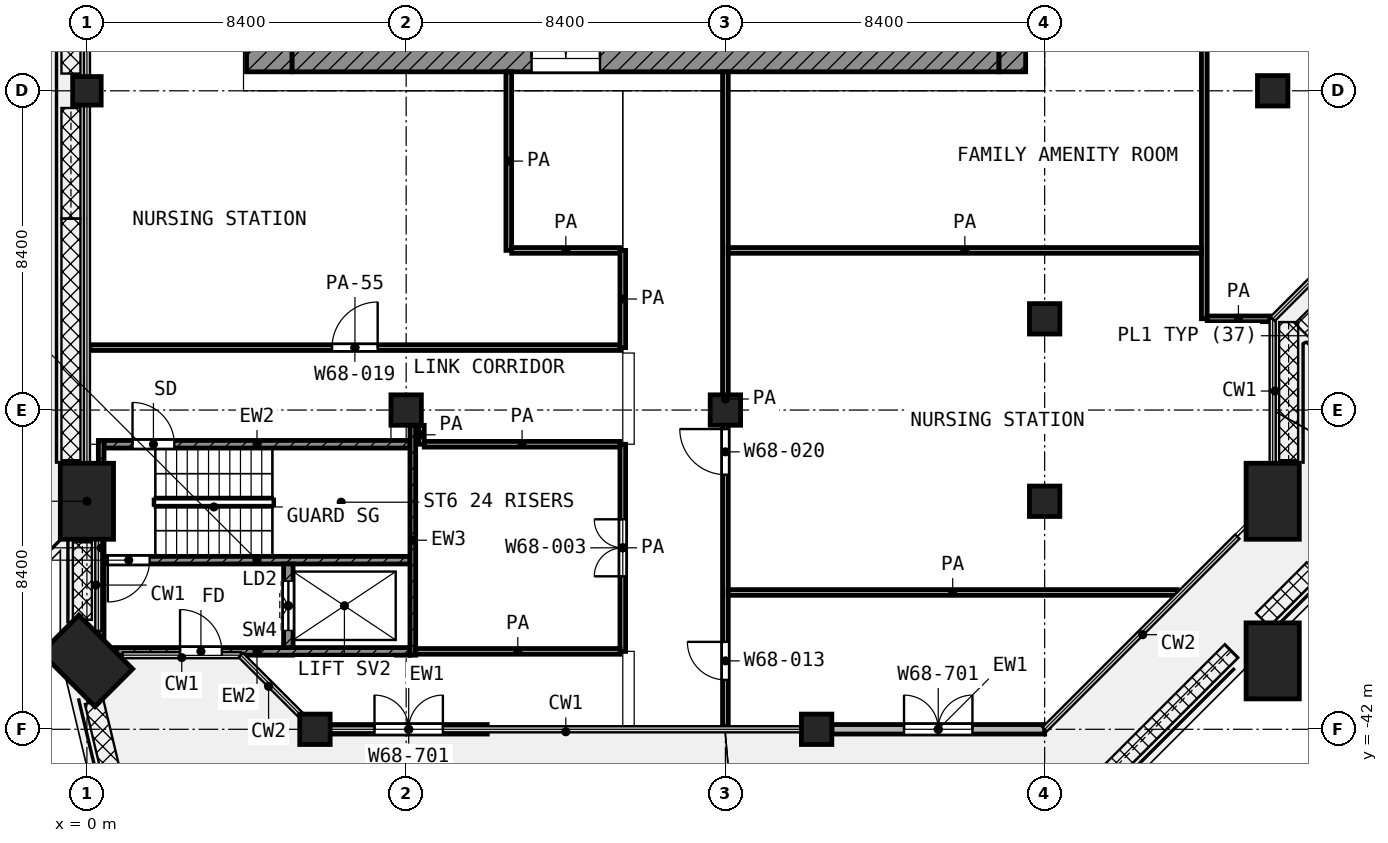
"""IFC4 building model, lengths in metres.
Left out: names, types, materials, properties, quantities, classifications, styles, units other than length and angle.
Written with IfcOpenShell. Run it as: python <this file> out.ifc"""

import sys

from ifc_helpers import new_model, si_unit, direction, frame, frame_2d, origin, origin_2d, place, context, subcontext, project, spatial, rectangle, extrude, element, fill, save


model = new_model("IFC4")
c1 = context("Model", 3, precision=1e-05, world=origin(), true_north=direction((0.0, 1.0)))
c2 = subcontext(c1, "Body", "Model", "MODEL_VIEW")
j1 = project(units=[si_unit("LENGTHUNIT", "METRE"), si_unit("PLANEANGLEUNIT", "RADIAN")], contexts=[c1])
p1 = place(None, origin())
s1 = spatial("IfcSite", under=j1, at=p1, CompositionType="ELEMENT")
p2 = place(p1, origin())
s2 = spatial("IfcBuilding", under=s1, at=p2, CompositionType="ELEMENT")
p3 = place(p2, frame((0.0, 0.0, 294.4)))
s3 = spatial("IfcBuildingStorey", under=s2, at=p3, CompositionType="ELEMENT", Elevation=294.4)
p4 = place(p3, frame((0.0, -25.2, 0.0), z_axis=(0.0, 0.0, 1.0), x_axis=(1.0, 0.0, 0.0)))
e1 = element("IfcColumn", 1, at=p4, inside=s3, PredefinedType="COLUMN", context=c2, shape_type="SweptSolid", body=[
    extrude(rectangle(XDim=0.75, YDim=0.75, at=origin_2d()), origin(), (0.0, 0.0, 1.0), 4.2),
])
for number, where, z_axis, x_axis in (
    (2, (31.2, -25.2, 0.0), (0.0, 0.0, 1.0), (1.0, 0.0, 0.0)),
    (3, (25.2, -31.2, 0.0), (0.0, 0.0, 1.0), (1.0, 0.0, 0.0)),
    (4, (8.4, -33.6, 0.0), (0.0, 0.0, 1.0), (1.0, 0.0, 0.0)),
    (5, (16.8, -33.6, 0.0), (0.0, 0.0, 1.0), (1.0, 0.0, 0.0)),
):
    element("IfcColumn", number, at=place(p3, frame(where, z_axis=z_axis, x_axis=x_axis)), inside=s3, PredefinedType="COLUMN", context=c2, shape_type="SweptSolid", body=[
        extrude(rectangle(XDim=0.8, YDim=0.8, at=origin_2d()), origin(), (0.0, 0.0, 1.0), 4.2),
    ])
p5 = place(p3, frame((0.0, -36.0, 0.0), z_axis=(0.0, 0.0, 1.0), x_axis=(0.0, 1.0, 0.0)))
e6 = element("IfcColumn", 6, at=p5, inside=s3, PredefinedType="COLUMN", context=c2, shape_type="SweptSolid", body=[
    extrude(rectangle(XDim=2.0, YDim=1.4, at=origin_2d()), origin(), (0.0, 0.0, 1.0), 4.2),
])
for number, where, z_axis, x_axis in (
    (7, (25.2, -36.0, 0.0), (0.0, 0.0, 1.0), (1.0, 0.0, 0.0)),
    (8, (6.0, -42.0, 0.0), (0.0, 0.0, 1.0), (1.0, 0.0, 0.0)),
    (9, (19.2, -42.0, 0.0), (0.0, 0.0, 1.0), (1.0, 0.0, 0.0)),
):
    element("IfcColumn", number, at=place(p3, frame(where, z_axis=z_axis, x_axis=x_axis)), inside=s3, PredefinedType="COLUMN", context=c2, shape_type="SweptSolid", body=[
        extrude(rectangle(XDim=0.8, YDim=0.8, at=origin_2d()), origin(), (0.0, 0.0, 1.0), 4.2),
    ])
for number, where, z_axis, x_axis in (
    (10, (31.2, -36.0, 0.0), (0.0, 0.0, 1.0), (0.0, -1.0, 0.0)),
    (11, (31.2, -40.2, 0.0), (0.0, 0.0, 1.0), (0.0, -1.0, 0.0)),
    (12, (0.0, -40.2, 0.0), (0.0, 0.0, 1.0), (-0.707, 0.707, 0.0)),
):
    element("IfcColumn", number, at=place(p3, frame(where, z_axis=z_axis, x_axis=x_axis)), inside=s3, PredefinedType="COLUMN", context=c2, shape_type="SweptSolid", body=[
        extrude(rectangle(XDim=2.0, YDim=1.4, at=origin_2d()), origin(), (0.0, 0.0, 1.0), 4.2),
    ])
p6 = place(p3, frame((6.4, -42.0, 0.0), z_axis=(0.0, 0.0, 1.0), x_axis=(1.0, 0.0, 0.0)))
e13 = element("IfcWall", 13, at=p6, inside=s3, PredefinedType="SOLIDWALL", context=c2, shape_type="SweptSolid", body=[
    extrude(rectangle(XDim=4.134, YDim=0.25, at=frame_2d((2.067, 0.0))), origin(), (0.0, 0.0, 1.0), 3.48),
])
p7 = place(p6, frame((1.167, 0.0, 0.0)))
e14 = element("IfcOpeningElement", 14, at=p7, cuts=e13, PredefinedType="OPENING", context=c2, shape_type="SweptSolid", body=[
    extrude(rectangle(XDim=1.8, YDim=2.1, at=frame_2d((0.9, 1.05))), frame((0.0, 0.135, 0.0), z_axis=(0.0, -1.0, 0.0), x_axis=(1.0, 0.0, 0.0)), (0.0, 0.0, 1.0), 0.27),
])
p8 = place(p3, frame((19.6, -42.0, 0.0), z_axis=(0.0, 0.0, 1.0), x_axis=(1.0, 0.0, 0.0)))
e15 = element("IfcWall", 15, at=p8, inside=s3, PredefinedType="SOLIDWALL", context=c2, shape_type="SweptSolid", body=[
    extrude(rectangle(XDim=5.6, YDim=0.25, at=frame_2d((2.8, 0.0))), origin(), (0.0, 0.0, 1.0), 3.48),
])
p9 = place(p8, frame((1.9, 0.0, 0.0)))
e16 = element("IfcOpeningElement", 16, at=p9, cuts=e15, PredefinedType="OPENING", context=c2, shape_type="SweptSolid", body=[
    extrude(rectangle(XDim=1.8, YDim=2.1, at=frame_2d((0.9, 1.05))), frame((0.0, 0.135, 0.0), z_axis=(0.0, -1.0, 0.0), x_axis=(1.0, 0.0, 0.0)), (0.0, 0.0, 1.0), 0.27),
])
p10 = place(p3, frame((4.8, -24.7, 0.0), z_axis=(0.0, 0.0, 1.0), x_axis=(0.0, 1.0, 0.0)))
e17 = element("IfcWall", 17, at=p10, inside=s3, PredefinedType="SHEAR", context=c2, shape_type="SweptSolid", body=[
    extrude(rectangle(XDim=19.3, YDim=1.2, at=frame_2d((9.65, 0.0))), origin(), (0.0, 0.0, 1.0), 3.6),
])
p11 = place(p10, frame((11.15, 0.0, 0.0)))
e18 = element("IfcOpeningElement", 18, at=p11, cuts=e17, PredefinedType="OPENING", context=c2, shape_type="SweptSolid", body=[
    extrude(rectangle(XDim=1.1, YDim=2.1, at=frame_2d((0.55, 1.05))), frame((0.0, 0.61, 0.0), z_axis=(0.0, -1.0, 0.0), x_axis=(1.0, 0.0, 0.0)), (0.0, 0.0, 1.0), 1.22),
])
p12 = place(p10, frame((1.85, 0.0, 0.0)))
e19 = element("IfcOpeningElement", 19, at=p12, cuts=e17, PredefinedType="OPENING", context=c2, shape_type="SweptSolid", body=[
    extrude(rectangle(XDim=1.1, YDim=2.1, at=frame_2d((0.55, 1.05))), frame((0.0, 0.61, 0.0), z_axis=(0.0, -1.0, 0.0), x_axis=(1.0, 0.0, 0.0)), (0.0, 0.0, 1.0), 1.22),
])
p13 = place(p3, frame((5.4, -24.35, 0.0), z_axis=(0.0, 0.0, 1.0), x_axis=(1.0, 0.0, 0.0)))
e20 = element("IfcWall", 20, at=p13, inside=s3, PredefinedType="SHEAR", context=c2, shape_type="SweptSolid", body=[
    extrude(rectangle(XDim=18.6, YDim=0.7, at=frame_2d((9.3, 0.0))), origin(), (0.0, 0.0, 1.0), 3.6),
])
p14 = place(p13, frame((6.3, 0.0, 0.0)))
e21 = element("IfcOpeningElement", 21, at=p14, cuts=e20, PredefinedType="OPENING", context=c2, shape_type="SweptSolid", body=[
    extrude(rectangle(XDim=1.8, YDim=2.1, at=frame_2d((0.9, 1.05))), frame((0.0, 0.36, 0.0), z_axis=(0.0, -1.0, 0.0), x_axis=(1.0, 0.0, 0.0)), (0.0, 0.0, 1.0), 0.72),
])
p15 = place(p3, frame((24.35, -24.7, 0.0), z_axis=(0.0, 0.0, 1.0), x_axis=(0.0, 1.0, 0.0)))
e22 = element("IfcWall", 22, at=p15, inside=s3, PredefinedType="SHEAR", context=c2, shape_type="SweptSolid", body=[
    extrude(rectangle(XDim=0.7, YDim=0.7, at=frame_2d((0.35, 0.0))), origin(), (0.0, 0.0, 1.0), 3.6),
])
p16 = place(p3, frame((0.375, -40.05, 0.0), z_axis=(0.0, 0.0, 1.0), x_axis=(0.0, 1.0, 0.0)))
e23 = element("IfcWall", 23, at=p16, inside=s3, PredefinedType="SHEAR", context=c2, shape_type="SweptSolid", body=[
    extrude(rectangle(XDim=5.65, YDim=0.15, at=frame_2d((2.825, 0.0))), origin(), (0.0, 0.0, 1.0), 3.6),
])
p17 = place(p3, frame((8.575, -40.05, 0.0), z_axis=(0.0, 0.0, 1.0), x_axis=(0.0, 1.0, 0.0)))
e24 = element("IfcWall", 24, at=p17, inside=s3, PredefinedType="SHEAR", context=c2, shape_type="SweptSolid", body=[
    extrude(rectangle(XDim=6.05, YDim=0.15, at=frame_2d((3.025, 0.0))), origin(), (0.0, 0.0, 1.0), 3.6),
])
p18 = place(p3, frame((0.45, -34.5, 0.0), z_axis=(0.0, 0.0, 1.0), x_axis=(1.0, 0.0, 0.0)))
e25 = element("IfcWall", 25, at=p18, inside=s3, PredefinedType="SHEAR", context=c2, shape_type="SweptSolid", body=[
    extrude(rectangle(XDim=8.05, YDim=0.2, at=frame_2d((4.025, 0.0))), origin(), (0.0, 0.0, 1.0), 3.6),
])
p19 = place(p18, frame((0.75, 0.0, 0.0)))
e26 = element("IfcOpeningElement", 26, at=p19, cuts=e25, PredefinedType="OPENING", context=c2, shape_type="SweptSolid", body=[
    extrude(rectangle(XDim=1.1, YDim=2.1, at=frame_2d((0.55, 1.05))), frame((0.0, 0.11, 0.0), z_axis=(0.0, -1.0, 0.0), x_axis=(1.0, 0.0, 0.0)), (0.0, 0.0, 1.0), 0.22),
])
p20 = place(p3, frame((0.45, -37.55, 0.0), z_axis=(0.0, 0.0, 1.0), x_axis=(1.0, 0.0, 0.0)))
e27 = element("IfcWall", 27, at=p20, inside=s3, PredefinedType="SHEAR", context=c2, shape_type="SweptSolid", body=[
    extrude(rectangle(XDim=8.05, YDim=0.2, at=frame_2d((4.025, 0.0))), origin(), (0.0, 0.0, 1.0), 3.6),
])
p21 = place(p20, frame((0.1, 0.0, 0.0)))
e28 = element("IfcOpeningElement", 28, at=p21, cuts=e27, PredefinedType="OPENING", context=c2, shape_type="SweptSolid", body=[
    extrude(rectangle(XDim=1.1, YDim=2.1, at=frame_2d((0.55, 1.05))), frame((0.0, 0.11, 0.0), z_axis=(0.0, -1.0, 0.0), x_axis=(1.0, 0.0, 0.0)), (0.0, 0.0, 1.0), 0.22),
])
p22 = place(p3, frame((0.45, -39.95, 0.0), z_axis=(0.0, 0.0, 1.0), x_axis=(1.0, 0.0, 0.0)))
e29 = element("IfcWall", 29, at=p22, inside=s3, PredefinedType="SHEAR", context=c2, shape_type="SweptSolid", body=[
    extrude(rectangle(XDim=8.05, YDim=0.2, at=frame_2d((4.025, 0.0))), origin(), (0.0, 0.0, 1.0), 3.6),
])
p23 = place(p22, frame((2.0, 0.0, 0.0)))
e30 = element("IfcOpeningElement", 30, at=p23, cuts=e29, PredefinedType="OPENING", context=c2, shape_type="SweptSolid", body=[
    extrude(rectangle(XDim=1.1, YDim=2.1, at=frame_2d((0.55, 1.05))), frame((0.0, 0.11, 0.0), z_axis=(0.0, -1.0, 0.0), x_axis=(1.0, 0.0, 0.0)), (0.0, 0.0, 1.0), 0.22),
])
p24 = place(p3, frame((5.3, -39.85, 0.0), z_axis=(0.0, 0.0, 1.0), x_axis=(0.0, 1.0, 0.0)))
e31 = element("IfcWall", 31, at=p24, inside=s3, PredefinedType="SHEAR", context=c2, shape_type="SweptSolid", body=[
    extrude(rectangle(XDim=2.2, YDim=0.25, at=frame_2d((1.1, 0.0))), origin(), (0.0, 0.0, 1.0), 3.6),
])
p25 = place(p24, frame((0.45, 0.0, 0.0)))
e32 = element("IfcOpeningElement", 32, at=p25, cuts=e31, PredefinedType="OPENING", context=c2, shape_type="SweptSolid", body=[
    extrude(rectangle(XDim=1.3, YDim=2.1, at=frame_2d((0.65, 1.05))), frame((0.0, 0.135, 0.0), z_axis=(0.0, -1.0, 0.0), x_axis=(1.0, 0.0, 0.0)), (0.0, 0.0, 1.0), 0.27),
])
p26 = place(p3, frame((8.65, -39.95, 0.0), z_axis=(0.0, 0.0, 1.0), x_axis=(1.0, 0.0, 0.0)))
e33 = element("IfcWall", 33, at=p26, inside=s3, PredefinedType="PARTITIONING", context=c2, shape_type="SweptSolid", body=[
    extrude(rectangle(XDim=5.375, YDim=0.15, at=frame_2d((2.688, 0.0))), origin(), (0.0, 0.0, 1.0), 3.6),
])
p27 = place(p3, frame((16.875, -38.4, 0.0), z_axis=(0.0, 0.0, 1.0), x_axis=(1.0, 0.0, 0.0)))
e34 = element("IfcWall", 34, at=p27, inside=s3, PredefinedType="PARTITIONING", context=c2, shape_type="SweptSolid", body=[
    extrude(rectangle(XDim=11.812, YDim=0.15, at=frame_2d((5.906, 0.0))), origin(), (0.0, 0.0, 1.0), 3.6),
])
p28 = place(p3, frame((8.875, -34.5, 0.0), z_axis=(0.0, 0.0, 1.0), x_axis=(1.0, 0.0, 0.0)))
e35 = element("IfcWall", 35, at=p28, inside=s3, PredefinedType="PARTITIONING", context=c2, shape_type="SweptSolid", body=[
    extrude(rectangle(XDim=5.15, YDim=0.15, at=frame_2d((2.575, 0.0))), origin(), (0.0, 0.0, 1.0), 3.6),
])
p29 = place(p3, frame((0.08, -31.957, 0.0), z_axis=(0.0, 0.0, 1.0), x_axis=(1.0, 0.0, 0.0)))
e36 = element("IfcWall", 36, at=p29, inside=s3, PredefinedType="PARTITIONING", context=c2, shape_type="SweptSolid", body=[
    extrude(rectangle(XDim=13.945, YDim=0.15, at=frame_2d((6.972, 0.0))), origin(), (0.0, 0.0, 1.0), 2.7),
])
p30 = place(p29, frame((6.37, 0.0, 0.0)))
e37 = element("IfcOpeningElement", 37, at=p30, cuts=e36, PredefinedType="OPENING", context=c2, shape_type="SweptSolid", body=[
    extrude(rectangle(XDim=1.2, YDim=2.1, at=frame_2d((0.6, 1.05))), frame((0.0, 0.085, 0.0), z_axis=(0.0, -1.0, 0.0), x_axis=(1.0, 0.0, 0.0)), (0.0, 0.0, 1.0), 0.17),
])
p31 = place(p3, frame((29.477, -31.2, 0.0), z_axis=(0.0, 0.0, 1.0), x_axis=(1.0, 0.0, 0.0)))
e38 = element("IfcWall", 38, at=p31, inside=s3, PredefinedType="PARTITIONING", context=c2, shape_type="SweptSolid", body=[
    extrude(rectangle(XDim=1.643, YDim=0.15, at=frame_2d((0.822, 0.0))), origin(), (0.0, 0.0, 1.0), 3.6),
])
p32 = place(p3, frame((11.177, -29.4, 0.0), z_axis=(0.0, 0.0, 1.0), x_axis=(1.0, 0.0, 0.0)))
e39 = element("IfcWall", 39, at=p32, inside=s3, PredefinedType="PARTITIONING", context=c2, shape_type="SweptSolid", body=[
    extrude(rectangle(XDim=2.848, YDim=0.15, at=frame_2d((1.424, 0.0))), origin(), (0.0, 0.0, 1.0), 3.6),
])
p33 = place(p3, frame((16.875, -29.4, 0.0), z_axis=(0.0, 0.0, 1.0), x_axis=(1.0, 0.0, 0.0)))
e40 = element("IfcWall", 40, at=p33, inside=s3, PredefinedType="PARTITIONING", context=c2, shape_type="SweptSolid", body=[
    extrude(rectangle(XDim=12.45, YDim=0.15, at=frame_2d((6.225, 0.0))), origin(), (0.0, 0.0, 1.0), 3.6),
])
p34 = place(p3, frame((8.8, -34.5, 0.0), z_axis=(0.0, 0.0, 1.0), x_axis=(0.0, 1.0, 0.0)))
e41 = element("IfcWall", 41, at=p34, inside=s3, PredefinedType="PARTITIONING", context=c2, shape_type="SweptSolid", body=[
    extrude(rectangle(XDim=0.499, YDim=0.15, at=frame_2d((0.25, 0.0))), origin(), (0.0, 0.0, 1.0), 3.6),
])
p35 = place(p3, frame((11.1, -29.399, 0.0), z_axis=(0.0, 0.0, 1.0), x_axis=(0.0, 1.0, 0.0)))
e42 = element("IfcWall", 42, at=p35, inside=s3, PredefinedType="PARTITIONING", context=c2, shape_type="SweptSolid", body=[
    extrude(rectangle(XDim=4.699, YDim=0.15, at=frame_2d((2.35, 0.0))), origin(), (0.0, 0.0, 1.0), 3.6),
])
p36 = place(p3, frame((14.1, -39.95, 0.0), z_axis=(0.0, 0.0, 1.0), x_axis=(0.0, 1.0, 0.0)))
e43 = element("IfcWall", 43, at=p36, inside=s3, PredefinedType="PARTITIONING", context=c2, shape_type="SweptSolid", body=[
    extrude(rectangle(XDim=5.45, YDim=0.15, at=frame_2d((2.725, 0.0))), origin(), (0.0, 0.0, 1.0), 3.6),
])
p37 = place(p36, frame((1.975, 0.0, 0.0)))
e44 = element("IfcOpeningElement", 44, at=p37, cuts=e43, PredefinedType="OPENING", context=c2, shape_type="SweptSolid", body=[
    extrude(rectangle(XDim=1.5, YDim=2.1, at=frame_2d((0.75, 1.05))), frame((0.0, 0.085, 0.0), z_axis=(0.0, -1.0, 0.0), x_axis=(1.0, 0.0, 0.0)), (0.0, 0.0, 1.0), 0.17),
])
p38 = place(p3, frame((14.1, -31.957, 0.0), z_axis=(0.0, 0.0, 1.0), x_axis=(0.0, 1.0, 0.0)))
e45 = element("IfcWall", 45, at=p38, inside=s3, PredefinedType="PARTITIONING", context=c2, shape_type="SweptSolid", body=[
    extrude(rectangle(XDim=2.557, YDim=0.15, at=frame_2d((1.279, 0.0))), origin(), (0.0, 0.0, 1.0), 3.6),
])
p39 = place(p3, frame((16.8, -41.92, 0.0), z_axis=(0.0, 0.0, 1.0), x_axis=(0.0, 1.0, 0.0)))
e46 = element("IfcWall", 46, at=p39, inside=s3, PredefinedType="PARTITIONING", context=c2, shape_type="SweptSolid", body=[
    extrude(rectangle(XDim=17.22, YDim=0.15, at=frame_2d((8.61, 0.0))), origin(), (0.0, 0.0, 1.0), 3.6),
])
p40 = place(p39, frame((6.62, 0.0, 0.0)))
e47 = element("IfcOpeningElement", 47, at=p40, cuts=e46, PredefinedType="OPENING", context=c2, shape_type="SweptSolid", body=[
    extrude(rectangle(XDim=1.2, YDim=2.1, at=frame_2d((0.6, 1.05))), frame((0.0, 0.085, 0.0), z_axis=(0.0, -1.0, 0.0), x_axis=(1.0, 0.0, 0.0)), (0.0, 0.0, 1.0), 0.17),
])
p41 = place(p39, frame((1.22, 0.0, 0.0)))
e48 = element("IfcOpeningElement", 48, at=p41, cuts=e46, PredefinedType="OPENING", context=c2, shape_type="SweptSolid", body=[
    extrude(rectangle(XDim=1.0, YDim=2.1, at=frame_2d((0.5, 1.05))), frame((0.0, 0.085, 0.0), z_axis=(0.0, -1.0, 0.0), x_axis=(1.0, 0.0, 0.0)), (0.0, 0.0, 1.0), 0.17),
])
p42 = place(p3, frame((29.4, -31.198, 0.0), z_axis=(0.0, 0.0, 1.0), x_axis=(0.0, 1.0, 0.0)))
e49 = element("IfcWall", 49, at=p42, inside=s3, PredefinedType="PARTITIONING", context=c2, shape_type="SweptSolid", body=[
    extrude(rectangle(XDim=14.323, YDim=0.15, at=frame_2d((7.162, 0.0))), origin(), (0.0, 0.0, 1.0), 3.6),
])
p43 = place(p7, origin())
e50 = element("IfcDoor", 50, at=p43, inside=s3, OperationType="DOUBLE_DOOR_SINGLE_SWING", PredefinedType="DOOR", context=c2, shape_type="SweptSolid", body=[
    extrude(rectangle(XDim=1.8, YDim=2.1, at=frame_2d((0.9, 1.05))), frame((0.0, 0.025, 0.0), z_axis=(0.0, -1.0, 0.0), x_axis=(1.0, 0.0, 0.0)), (0.0, 0.0, 1.0), 0.05),
])
fill(e14, e50)
p44 = place(p9, origin())
e51 = element("IfcDoor", 51, at=p44, inside=s3, OperationType="DOUBLE_DOOR_SINGLE_SWING", PredefinedType="DOOR", context=c2, shape_type="SweptSolid", body=[
    extrude(rectangle(XDim=1.8, YDim=2.1, at=frame_2d((0.9, 1.05))), frame((0.0, 0.025, 0.0), z_axis=(0.0, -1.0, 0.0), x_axis=(1.0, 0.0, 0.0)), (0.0, 0.0, 1.0), 0.05),
])
fill(e16, e51)
p45 = place(p14, origin())
e52 = element("IfcDoor", 52, at=p45, inside=s3, OperationType="DOUBLE_DOOR_SINGLE_SWING", PredefinedType="DOOR", context=c2, shape_type="SweptSolid", body=[
    extrude(rectangle(XDim=1.8, YDim=2.1, at=frame_2d((0.9, 1.05))), frame((0.0, 0.025, 0.0), z_axis=(0.0, -1.0, 0.0), x_axis=(1.0, 0.0, 0.0)), (0.0, 0.0, 1.0), 0.05),
])
fill(e21, e52)
p46 = place(p19, origin())
e53 = element("IfcDoor", 53, at=p46, inside=s3, OperationType="SINGLE_SWING_LEFT", PredefinedType="DOOR", context=c2, shape_type="SweptSolid", body=[
    extrude(rectangle(XDim=1.1, YDim=2.1, at=frame_2d((0.55, 1.05))), frame((0.0, 0.025, 0.0), z_axis=(0.0, -1.0, 0.0), x_axis=(1.0, 0.0, 0.0)), (0.0, 0.0, 1.0), 0.05),
])
fill(e26, e53)
p47 = place(p21, frame((1.1, 0.0, 0.0), z_axis=(0.0, 0.0, 1.0), x_axis=(-1.0, 0.0, 0.0)))
e54 = element("IfcDoor", 54, at=p47, inside=s3, OperationType="SINGLE_SWING_LEFT", PredefinedType="DOOR", context=c2, shape_type="SweptSolid", body=[
    extrude(rectangle(XDim=1.1, YDim=2.1, at=frame_2d((0.55, 1.05))), frame((0.0, 0.025, 0.0), z_axis=(0.0, -1.0, 0.0), x_axis=(1.0, 0.0, 0.0)), (0.0, 0.0, 1.0), 0.05),
])
fill(e28, e54)
p48 = place(p25, origin())
e55 = element("IfcDoor", 55, at=p48, inside=s3, OperationType="DOUBLE_DOOR_SLIDING", PredefinedType="DOOR", context=c2, shape_type="SweptSolid", body=[
    extrude(rectangle(XDim=1.3, YDim=2.1, at=frame_2d((0.65, 1.05))), frame((0.0, 0.025, 0.0), z_axis=(0.0, -1.0, 0.0), x_axis=(1.0, 0.0, 0.0)), (0.0, 0.0, 1.0), 0.05),
])
fill(e32, e55)
p49 = place(p23, origin())
e56 = element("IfcDoor", 56, at=p49, inside=s3, OperationType="SINGLE_SWING_LEFT", PredefinedType="DOOR", context=c2, shape_type="SweptSolid", body=[
    extrude(rectangle(XDim=1.1, YDim=2.1, at=frame_2d((0.55, 1.05))), frame((0.0, 0.025, 0.0), z_axis=(0.0, -1.0, 0.0), x_axis=(1.0, 0.0, 0.0)), (0.0, 0.0, 1.0), 0.05),
])
fill(e30, e56)
p50 = place(p30, origin())
e57 = element("IfcDoor", 57, at=p50, inside=s3, OperationType="SINGLE_SWING_RIGHT", PredefinedType="DOOR", context=c2, shape_type="SweptSolid", body=[
    extrude(rectangle(XDim=1.2, YDim=2.1, at=frame_2d((0.6, 1.05))), frame((0.0, 0.025, 0.0), z_axis=(0.0, -1.0, 0.0), x_axis=(1.0, 0.0, 0.0)), (0.0, 0.0, 1.0), 0.05),
])
fill(e37, e57)
p51 = place(p37, origin())
e58 = element("IfcDoor", 58, at=p51, inside=s3, OperationType="DOUBLE_DOOR_SINGLE_SWING", PredefinedType="DOOR", context=c2, shape_type="SweptSolid", body=[
    extrude(rectangle(XDim=1.5, YDim=2.1, at=frame_2d((0.75, 1.05))), frame((0.0, 0.025, 0.0), z_axis=(0.0, -1.0, 0.0), x_axis=(1.0, 0.0, 0.0)), (0.0, 0.0, 1.0), 0.05),
])
fill(e44, e58)
p52 = place(p40, origin())
e59 = element("IfcDoor", 59, at=p52, inside=s3, OperationType="SINGLE_SWING_RIGHT", PredefinedType="DOOR", context=c2, shape_type="SweptSolid", body=[
    extrude(rectangle(XDim=1.2, YDim=2.1, at=frame_2d((0.6, 1.05))), frame((0.0, 0.025, 0.0), z_axis=(0.0, -1.0, 0.0), x_axis=(1.0, 0.0, 0.0)), (0.0, 0.0, 1.0), 0.05),
])
fill(e47, e59)
p53 = place(p41, origin())
e60 = element("IfcDoor", 60, at=p53, inside=s3, OperationType="SINGLE_SWING_RIGHT", PredefinedType="DOOR", context=c2, shape_type="SweptSolid", body=[
    extrude(rectangle(XDim=1.0, YDim=2.1, at=frame_2d((0.5, 1.05))), frame((0.0, 0.025, 0.0), z_axis=(0.0, -1.0, 0.0), x_axis=(1.0, 0.0, 0.0)), (0.0, 0.0, 1.0), 0.05),
])
fill(e48, e60)
save(model, sys.argv[1])
